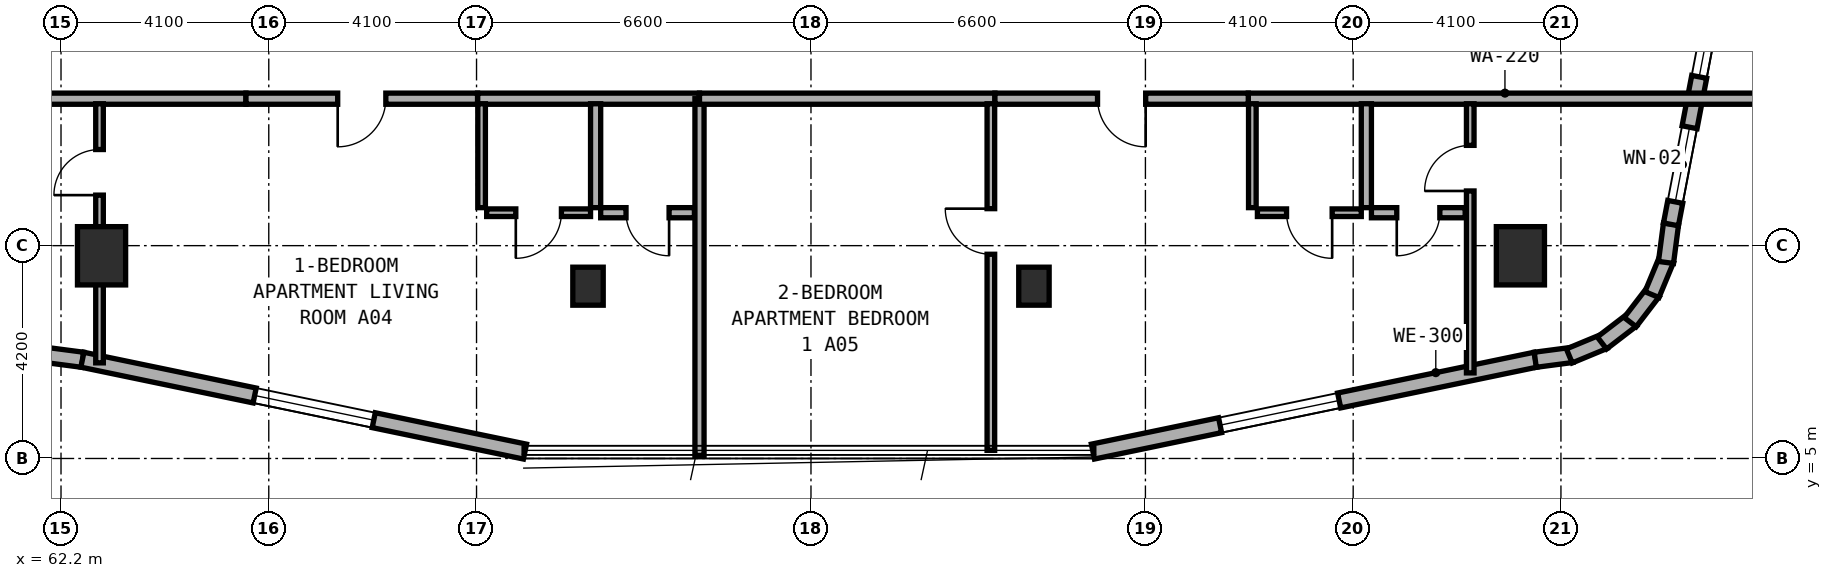
"""IFC4 building model, lengths in metres.
Left out: names, types, materials, properties, quantities, classifications, styles, units other than length and angle.
Written with IfcOpenShell. Run it as: python <this file> out.ifc"""

import sys

from ifc_helpers import new_model, si_unit, direction, frame, frame_2d, origin, origin_2d, place, context, subcontext, project, spatial, rectangle, extrude, element, fill, save


model = new_model("IFC4")
c1 = context("Model", 3, precision=1e-05, world=origin(), true_north=direction((0.0, 1.0)))
c2 = subcontext(c1, "Body", "Model", "MODEL_VIEW")
j1 = project(units=[si_unit("LENGTHUNIT", "METRE"), si_unit("PLANEANGLEUNIT", "RADIAN")], contexts=[c1])
p1 = place(None, origin())
s1 = spatial("IfcSite", under=j1, at=p1, CompositionType="ELEMENT")
p2 = place(p1, origin())
s2 = spatial("IfcBuilding", under=s1, at=p2, CompositionType="ELEMENT")
p3 = place(p2, frame((0.0, 0.0, 73.0)))
s3 = spatial("IfcBuildingStorey", under=s2, at=p3, CompositionType="ELEMENT", Elevation=73.0)
for number, where, z_axis, x_axis in (
    (1, (72.6, 8.4, 0.0), (0.0, 0.0, 1.0), (1.0, 0.0, 0.0)),
    (2, (81.4, 8.4, 0.0), (0.0, 0.0, 1.0), (1.0, 0.0, 0.0)),
):
    element("IfcColumn", number, at=place(p3, frame(where, z_axis=z_axis, x_axis=x_axis)), inside=s3, PredefinedType="COLUMN", context=c2, shape_type="SweptSolid", body=[
        extrude(rectangle(XDim=0.6, YDim=0.75, at=origin_2d()), origin(), (0.0, 0.0, 1.0), 3.5),
    ])
for number, where, z_axis, x_axis in (
    (3, (63.0, 9.0, 0.0), (0.0, 0.0, 1.0), (1.0, 0.0, 0.0)),
    (4, (91.0, 9.0, 0.0), (0.0, 0.0, 1.0), (1.0, 0.0, 0.0)),
):
    element("IfcColumn", number, at=place(p3, frame(where, z_axis=z_axis, x_axis=x_axis)), inside=s3, PredefinedType="COLUMN", context=c2, shape_type="SweptSolid", body=[
        extrude(rectangle(XDim=0.95, YDim=1.15, at=origin_2d()), origin(), (0.0, 0.0, 1.0), 3.5),
    ])
p4 = place(p3, frame((61.869, 7.047, 0.0), z_axis=(0.0, 0.0, 1.0), x_axis=(0.991559404866, -0.129653178221, 0.0)))
e5 = element("IfcWall", 5, at=p4, inside=s3, PredefinedType="STANDARD", context=c2, shape_type="SweptSolid", body=[
    extrude(rectangle(XDim=0.764, YDim=0.3, at=frame_2d((0.382, 0.0))), origin(), (0.0, 0.0, 1.0), 3.25),
])
p5 = place(p3, frame((62.622, 6.949, 0.0), z_axis=(0.0, 0.0, 1.0), x_axis=(0.979127260729, -0.203248142175, 0.0)))
e6 = element("IfcWall", 6, at=p5, inside=s3, PredefinedType="STANDARD", context=c2, shape_type="SweptSolid", body=[
    extrude(rectangle(XDim=8.92, YDim=0.3, at=frame_2d((4.46, 0.0))), origin(), (0.0, 0.0, 1.0), 3.25),
])
p6 = place(p5, frame((3.472, 0.0, 0.8)))
e7 = element("IfcOpeningElement", 7, at=p6, cuts=e6, PredefinedType="OPENING", context=c2, shape_type="SweptSolid", body=[
    extrude(rectangle(XDim=2.4, YDim=1.6, at=frame_2d((1.2, 0.8))), frame((0.0, 0.16, 0.0), z_axis=(0.0, -1.0, 0.0), x_axis=(1.0, 0.0, 0.0)), (0.0, 0.0, 1.0), 0.32),
])
p7 = place(p3, frame((82.564, 5.136, 0.0), z_axis=(0.0, 0.0, 1.0), x_axis=(0.979128391325, 0.203242695569, 0.0)))
e8 = element("IfcWall", 8, at=p7, inside=s3, PredefinedType="STANDARD", context=c2, shape_type="SweptSolid", body=[
    extrude(rectangle(XDim=8.92, YDim=0.3, at=frame_2d((4.46, 0.0))), origin(), (0.0, 0.0, 1.0), 3.25),
])
p8 = place(p7, frame((2.563, 0.0, 0.8)))
e9 = element("IfcOpeningElement", 9, at=p8, cuts=e8, PredefinedType="OPENING", context=c2, shape_type="SweptSolid", body=[
    extrude(rectangle(XDim=2.4, YDim=1.6, at=frame_2d((1.2, 0.8))), frame((0.0, 0.16, 0.0), z_axis=(0.0, -1.0, 0.0), x_axis=(1.0, 0.0, 0.0)), (0.0, 0.0, 1.0), 0.32),
])
p9 = place(p3, frame((91.293, 6.948, 0.0), z_axis=(0.0, 0.0, 1.0), x_axis=(0.991486167159, 0.13021205909, 0.0)))
e10 = element("IfcWall", 10, at=p9, inside=s3, PredefinedType="STANDARD", context=c2, shape_type="SweptSolid", body=[
    extrude(rectangle(XDim=0.729, YDim=0.3, at=frame_2d((0.365, 0.0))), origin(), (0.0, 0.0, 1.0), 3.25),
])
for number, where, z_axis, x_axis in (
    (11, (91.965, 7.024, 0.0), (0.0, 0.0, 1.0), (0.924, 0.384, 0.0)),
    (12, (92.609, 7.279, 0.0), (0.0, 0.0, 1.0), (0.794, 0.608, 0.0)),
    (13, (93.166, 7.691, 0.0), (0.0, 0.0, 1.0), (0.609, 0.793, 0.0)),
):
    element("IfcWall", number, at=place(p3, frame(where, z_axis=z_axis, x_axis=x_axis)), inside=s3, PredefinedType="STANDARD", context=c2, shape_type="SweptSolid", body=[
        extrude(rectangle(XDim=0.746, YDim=0.3, at=frame_2d((0.373, 0.0))), origin(), (0.0, 0.0, 1.0), 3.25),
    ])
p10 = place(p3, frame((93.596, 8.234, 0.0), z_axis=(0.0, 0.0, 1.0), x_axis=(0.383430326427, 0.923569805037, 0.0)))
e14 = element("IfcWall", 14, at=p10, inside=s3, PredefinedType="STANDARD", context=c2, shape_type="SweptSolid", body=[
    extrude(rectangle(XDim=0.746, YDim=0.3, at=frame_2d((0.373, 0.0))), origin(), (0.0, 0.0, 1.0), 3.25),
])
p11 = place(p3, frame((93.873, 8.869, 0.0), z_axis=(0.0, 0.0, 1.0), x_axis=(0.129339184068, 0.991600411186, 0.0)))
e15 = element("IfcWall", 15, at=p11, inside=s3, PredefinedType="STANDARD", context=c2, shape_type="SweptSolid", body=[
    extrude(rectangle(XDim=0.764, YDim=0.3, at=frame_2d((0.382, 0.0))), origin(), (0.0, 0.0, 1.0), 3.25),
])
p12 = place(p3, frame((93.971, 9.62, 0.0), z_axis=(0.0, 0.0, 1.0), x_axis=(0.188087874316, 0.982152203854, 0.0)))
e16 = element("IfcWall", 16, at=p12, inside=s3, PredefinedType="STANDARD", context=c2, shape_type="SweptSolid", body=[
    extrude(rectangle(XDim=9.634, YDim=0.3, at=frame_2d((4.817, 0.0))), origin(), (0.0, 0.0, 1.0), 3.25),
])
p13 = place(p12, frame((0.452, 0.0, 0.85)))
e17 = element("IfcOpeningElement", 17, at=p13, cuts=e16, PredefinedType="OPENING", context=c2, shape_type="SweptSolid", body=[
    extrude(rectangle(XDim=1.5, YDim=1.5, at=frame_2d((0.75, 0.75))), frame((0.0, 0.16, 0.0), z_axis=(0.0, -1.0, 0.0), x_axis=(1.0, 0.0, 0.0)), (0.0, 0.0, 1.0), 0.32),
])
p14 = place(p12, frame((2.964, 0.0, 0.85)))
e18 = element("IfcOpeningElement", 18, at=p14, cuts=e16, PredefinedType="OPENING", context=c2, shape_type="SweptSolid", body=[
    extrude(rectangle(XDim=1.2, YDim=1.5, at=frame_2d((0.6, 0.75))), frame((0.0, 0.16, 0.0), z_axis=(0.0, -1.0, 0.0), x_axis=(1.0, 0.0, 0.0)), (0.0, 0.0, 1.0), 0.32),
])
p15 = place(p12, frame((5.979, 0.0, 0.8)))
e19 = element("IfcOpeningElement", 19, at=p15, cuts=e16, PredefinedType="OPENING", context=c2, shape_type="SweptSolid", body=[
    extrude(rectangle(XDim=2.4, YDim=1.6, at=frame_2d((1.2, 0.8))), frame((0.0, 0.16, 0.0), z_axis=(0.0, -1.0, 0.0), x_axis=(1.0, 0.0, 0.0)), (0.0, 0.0, 1.0), 0.32),
])
p16 = place(p3, frame((58.16, 12.1, 0.0), z_axis=(0.0, 0.0, 1.0), x_axis=(1.0, 0.0, 0.0)))
e20 = element("IfcWall", 20, at=p16, inside=s3, PredefinedType="SOLIDWALL", context=c2, shape_type="SweptSolid", body=[
    extrude(rectangle(XDim=7.69, YDim=0.22, at=frame_2d((3.845, 0.0))), origin(), (0.0, 0.0, 1.0), 2.865),
])
p17 = place(p3, frame((70.42, 12.1, 0.0), z_axis=(0.0, 0.0, 1.0), x_axis=(1.0, 0.0, 0.0)))
e21 = element("IfcWall", 21, at=p17, inside=s3, PredefinedType="SOLIDWALL", context=c2, shape_type="SweptSolid", body=[
    extrude(rectangle(XDim=4.38, YDim=0.22, at=frame_2d((2.19, 0.0))), origin(), (0.0, 0.0, 1.0), 2.725),
])
p18 = place(p3, frame((65.85, 12.1, 0.0), z_axis=(0.0, 0.0, 1.0), x_axis=(1.0, 0.0, 0.0)))
e22 = element("IfcWall", 22, at=p18, inside=s3, PredefinedType="SOLIDWALL", context=c2, shape_type="SweptSolid", body=[
    extrude(rectangle(XDim=4.57, YDim=0.22, at=frame_2d((2.285, 0.0))), origin(), (0.0, 0.0, 1.0), 3.22),
])
p19 = place(p18, frame((1.81, 0.0, 0.0)))
e23 = element("IfcOpeningElement", 23, at=p19, cuts=e22, PredefinedType="OPENING", context=c2, shape_type="SweptSolid", body=[
    extrude(rectangle(XDim=0.95, YDim=2.1, at=frame_2d((0.475, 1.05))), frame((0.0, 0.12, 0.0), z_axis=(0.0, -1.0, 0.0), x_axis=(1.0, 0.0, 0.0)), (0.0, 0.0, 1.0), 0.24),
])
p20 = place(p3, frame((62.96, 6.887, 0.0), z_axis=(0.0, 0.0, 1.0), x_axis=(0.0, 1.0, 0.0)))
e24 = element("IfcWall", 24, at=p20, inside=s3, PredefinedType="PARTITIONING", context=c2, shape_type="SweptSolid", body=[
    extrude(rectangle(XDim=5.113, YDim=0.15, at=frame_2d((2.557, 0.0))), origin(), (0.0, 0.0, 1.0), 2.865),
])
p21 = place(p20, frame((3.31, 0.0, 0.0)))
e25 = element("IfcOpeningElement", 25, at=p21, cuts=e24, PredefinedType="OPENING", context=c2, shape_type="SweptSolid", body=[
    extrude(rectangle(XDim=0.9, YDim=2.1, at=frame_2d((0.45, 1.05))), frame((0.0, 0.085, 0.0), z_axis=(0.0, -1.0, 0.0), x_axis=(1.0, 0.0, 0.0)), (0.0, 0.0, 1.0), 0.17),
])
p22 = place(p3, frame((72.75, 9.95, 0.0), z_axis=(0.0, 0.0, 1.0), x_axis=(0.0, 1.0, 0.0)))
e26 = element("IfcWall", 26, at=p22, inside=s3, PredefinedType="PLUMBINGWALL", context=c2, shape_type="SweptSolid", body=[
    extrude(rectangle(XDim=2.05, YDim=0.2, at=frame_2d((1.025, 0.0))), origin(), (0.0, 0.0, 1.0), 2.725),
])
p23 = place(p3, frame((70.5, 9.95, 0.0), z_axis=(0.0, 0.0, 1.0), x_axis=(0.0, 1.0, 0.0)))
e27 = element("IfcWall", 27, at=p23, inside=s3, PredefinedType="PARTITIONING", context=c2, shape_type="SweptSolid", body=[
    extrude(rectangle(XDim=2.05, YDim=0.15, at=frame_2d((1.025, 0.0))), origin(), (0.0, 0.0, 1.0), 3.22),
])
p24 = place(p3, frame((72.85, 9.85, 0.0), z_axis=(0.0, 0.0, 1.0), x_axis=(1.0, 0.0, 0.0)))
e28 = element("IfcWall", 28, at=p24, inside=s3, PredefinedType="PLUMBINGWALL", context=c2, shape_type="SweptSolid", body=[
    extrude(rectangle(XDim=1.85, YDim=0.2, at=frame_2d((0.925, 0.0))), origin(), (0.0, 0.0, 1.0), 3.22),
])
p25 = place(p24, frame((0.5, 0.0, 0.0)))
e29 = element("IfcOpeningElement", 29, at=p25, cuts=e28, PredefinedType="OPENING", context=c2, shape_type="SweptSolid", body=[
    extrude(rectangle(XDim=0.85, YDim=2.1, at=frame_2d((0.425, 1.05))), frame((0.0, 0.11, 0.0), z_axis=(0.0, -1.0, 0.0), x_axis=(1.0, 0.0, 0.0)), (0.0, 0.0, 1.0), 0.22),
])
p26 = place(p3, frame((70.6, 9.85, 0.0), z_axis=(0.0, 0.0, 1.0), x_axis=(1.0, 0.0, 0.0)))
e30 = element("IfcWall", 30, at=p26, inside=s3, PredefinedType="PARTITIONING", context=c2, shape_type="SweptSolid", body=[
    extrude(rectangle(XDim=2.05, YDim=0.15, at=frame_2d((1.025, 0.0))), origin(), (0.0, 0.0, 1.0), 2.725),
])
p27 = place(p26, frame((0.575, 0.0, 0.0)))
e31 = element("IfcOpeningElement", 31, at=p27, cuts=e30, PredefinedType="OPENING", context=c2, shape_type="SweptSolid", body=[
    extrude(rectangle(XDim=0.9, YDim=2.1, at=frame_2d((0.45, 1.05))), frame((0.0, 0.085, 0.0), z_axis=(0.0, -1.0, 0.0), x_axis=(1.0, 0.0, 0.0)), (0.0, 0.0, 1.0), 0.17),
])
p28 = place(p3, frame((74.8, 5.06, 0.0), z_axis=(0.0, 0.0, 1.0), x_axis=(0.0, 1.0, 0.0)))
e32 = element("IfcWall", 32, at=p28, inside=s3, PredefinedType="SOLIDWALL", context=c2, shape_type="SweptSolid", body=[
    extrude(rectangle(XDim=7.04, YDim=0.18, at=frame_2d((3.52, 0.0))), origin(), (0.0, 0.0, 1.0), 2.865),
])
p29 = place(p3, frame((74.8, 12.1, 0.0), z_axis=(0.0, 0.0, 1.0), x_axis=(1.0, 0.0, 0.0)))
e33 = element("IfcWall", 33, at=p29, inside=s3, PredefinedType="SOLIDWALL", context=c2, shape_type="SweptSolid", body=[
    extrude(rectangle(XDim=5.83, YDim=0.22, at=frame_2d((2.915, 0.0))), origin(), (0.0, 0.0, 1.0), 3.22),
])
p30 = place(p3, frame((85.63, 12.1, 0.0), z_axis=(0.0, 0.0, 1.0), x_axis=(1.0, 0.0, 0.0)))
e34 = element("IfcWall", 34, at=p30, inside=s3, PredefinedType="SOLIDWALL", context=c2, shape_type="SweptSolid", body=[
    extrude(rectangle(XDim=10.13, YDim=0.22, at=frame_2d((5.065, 0.0))), origin(), (0.0, 0.0, 1.0), 2.865),
])
p31 = place(p3, frame((80.63, 12.1, 0.0), z_axis=(0.0, 0.0, 1.0), x_axis=(1.0, 0.0, 0.0)))
e35 = element("IfcWall", 35, at=p31, inside=s3, PredefinedType="SOLIDWALL", context=c2, shape_type="SweptSolid", body=[
    extrude(rectangle(XDim=5.0, YDim=0.22, at=frame_2d((2.5, 0.0))), origin(), (0.0, 0.0, 1.0), 2.725),
])
p32 = place(p31, frame((2.025, 0.0, 0.0)))
e36 = element("IfcOpeningElement", 36, at=p32, cuts=e35, PredefinedType="OPENING", context=c2, shape_type="SweptSolid", body=[
    extrude(rectangle(XDim=0.95, YDim=2.1, at=frame_2d((0.475, 1.05))), frame((0.0, 0.12, 0.0), z_axis=(0.0, -1.0, 0.0), x_axis=(1.0, 0.0, 0.0)), (0.0, 0.0, 1.0), 0.24),
])
p33 = place(p3, frame((80.55, 5.16, 0.0), z_axis=(0.0, 0.0, 1.0), x_axis=(0.0, 1.0, 0.0)))
e37 = element("IfcWall", 37, at=p33, inside=s3, PredefinedType="PARTITIONING", context=c2, shape_type="SweptSolid", body=[
    extrude(rectangle(XDim=6.84, YDim=0.15, at=frame_2d((3.42, 0.0))), origin(), (0.0, 0.0, 1.0), 2.865),
])
p34 = place(p33, frame((3.87, 0.0, 0.0)))
e38 = element("IfcOpeningElement", 38, at=p34, cuts=e37, PredefinedType="OPENING", context=c2, shape_type="SweptSolid", body=[
    extrude(rectangle(XDim=0.9, YDim=2.1, at=frame_2d((0.45, 1.05))), frame((0.0, 0.085, 0.0), z_axis=(0.0, -1.0, 0.0), x_axis=(1.0, 0.0, 0.0)), (0.0, 0.0, 1.0), 0.17),
])
p35 = place(p3, frame((90.01, 6.689, 0.0), z_axis=(0.0, 0.0, 1.0), x_axis=(0.0, 1.0, 0.0)))
e39 = element("IfcWall", 39, at=p35, inside=s3, PredefinedType="PARTITIONING", context=c2, shape_type="SweptSolid", body=[
    extrude(rectangle(XDim=5.311, YDim=0.15, at=frame_2d((2.656, 0.0))), origin(), (0.0, 0.0, 1.0), 2.865),
])
p36 = place(p35, frame((3.59, 0.0, 0.0)))
e40 = element("IfcOpeningElement", 40, at=p36, cuts=e39, PredefinedType="OPENING", context=c2, shape_type="SweptSolid", body=[
    extrude(rectangle(XDim=0.9, YDim=2.1, at=frame_2d((0.45, 1.05))), frame((0.0, 0.085, 0.0), z_axis=(0.0, -1.0, 0.0), x_axis=(1.0, 0.0, 0.0)), (0.0, 0.0, 1.0), 0.17),
])
p37 = place(p3, frame((87.96, 9.95, 0.0), z_axis=(0.0, 0.0, 1.0), x_axis=(0.0, 1.0, 0.0)))
e41 = element("IfcWall", 41, at=p37, inside=s3, PredefinedType="PLUMBINGWALL", context=c2, shape_type="SweptSolid", body=[
    extrude(rectangle(XDim=2.05, YDim=0.2, at=frame_2d((1.025, 0.0))), origin(), (0.0, 0.0, 1.0), 3.22),
])
p38 = place(p3, frame((85.71, 9.95, 0.0), z_axis=(0.0, 0.0, 1.0), x_axis=(0.0, 1.0, 0.0)))
e42 = element("IfcWall", 42, at=p38, inside=s3, PredefinedType="PARTITIONING", context=c2, shape_type="SweptSolid", body=[
    extrude(rectangle(XDim=2.05, YDim=0.15, at=frame_2d((1.025, 0.0))), origin(), (0.0, 0.0, 1.0), 3.22),
])
p39 = place(p3, frame((88.06, 9.85, 0.0), z_axis=(0.0, 0.0, 1.0), x_axis=(1.0, 0.0, 0.0)))
e43 = element("IfcWall", 43, at=p39, inside=s3, PredefinedType="PLUMBINGWALL", context=c2, shape_type="SweptSolid", body=[
    extrude(rectangle(XDim=1.85, YDim=0.2, at=frame_2d((0.925, 0.0))), origin(), (0.0, 0.0, 1.0), 3.22),
])
p40 = place(p39, frame((0.5, 0.0, 0.0)))
e44 = element("IfcOpeningElement", 44, at=p40, cuts=e43, PredefinedType="OPENING", context=c2, shape_type="SweptSolid", body=[
    extrude(rectangle(XDim=0.85, YDim=2.1, at=frame_2d((0.425, 1.05))), frame((0.0, 0.11, 0.0), z_axis=(0.0, -1.0, 0.0), x_axis=(1.0, 0.0, 0.0)), (0.0, 0.0, 1.0), 0.22),
])
p41 = place(p3, frame((85.81, 9.85, 0.0), z_axis=(0.0, 0.0, 1.0), x_axis=(1.0, 0.0, 0.0)))
e45 = element("IfcWall", 45, at=p41, inside=s3, PredefinedType="PARTITIONING", context=c2, shape_type="SweptSolid", body=[
    extrude(rectangle(XDim=2.05, YDim=0.15, at=frame_2d((1.025, 0.0))), origin(), (0.0, 0.0, 1.0), 3.22),
])
p42 = place(p41, frame((0.575, 0.0, 0.0)))
e46 = element("IfcOpeningElement", 46, at=p42, cuts=e45, PredefinedType="OPENING", context=c2, shape_type="SweptSolid", body=[
    extrude(rectangle(XDim=0.9, YDim=2.1, at=frame_2d((0.45, 1.05))), frame((0.0, 0.085, 0.0), z_axis=(0.0, -1.0, 0.0), x_axis=(1.0, 0.0, 0.0)), (0.0, 0.0, 1.0), 0.17),
])
p43 = place(p6, origin())
e47 = element("IfcWindow", 47, at=p43, inside=s3, PartitioningType="SINGLE_PANEL", PredefinedType="WINDOW", context=c2, shape_type="SweptSolid", body=[
    extrude(rectangle(XDim=2.4, YDim=1.6, at=frame_2d((1.2, 0.8))), frame((0.0, 0.03, 0.0), z_axis=(0.0, -1.0, 0.0), x_axis=(1.0, 0.0, 0.0)), (0.0, 0.0, 1.0), 0.06),
])
fill(e7, e47)
p44 = place(p8, origin())
e48 = element("IfcWindow", 48, at=p44, inside=s3, PartitioningType="SINGLE_PANEL", PredefinedType="WINDOW", context=c2, shape_type="SweptSolid", body=[
    extrude(rectangle(XDim=2.4, YDim=1.6, at=frame_2d((1.2, 0.8))), frame((0.0, 0.03, 0.0), z_axis=(0.0, -1.0, 0.0), x_axis=(1.0, 0.0, 0.0)), (0.0, 0.0, 1.0), 0.06),
])
fill(e9, e48)
p45 = place(p13, origin())
e49 = element("IfcWindow", 49, at=p45, inside=s3, PartitioningType="SINGLE_PANEL", PredefinedType="WINDOW", context=c2, shape_type="SweptSolid", body=[
    extrude(rectangle(XDim=1.5, YDim=1.5, at=frame_2d((0.75, 0.75))), frame((0.0, 0.03, 0.0), z_axis=(0.0, -1.0, 0.0), x_axis=(1.0, 0.0, 0.0)), (0.0, 0.0, 1.0), 0.06),
])
fill(e17, e49)
p46 = place(p14, origin())
e50 = element("IfcWindow", 50, at=p46, inside=s3, PartitioningType="SINGLE_PANEL", PredefinedType="WINDOW", context=c2, shape_type="SweptSolid", body=[
    extrude(rectangle(XDim=1.2, YDim=1.5, at=frame_2d((0.6, 0.75))), frame((0.0, 0.03, 0.0), z_axis=(0.0, -1.0, 0.0), x_axis=(1.0, 0.0, 0.0)), (0.0, 0.0, 1.0), 0.06),
])
fill(e18, e50)
p47 = place(p19, frame((0.95, 0.0, 0.0), z_axis=(0.0, 0.0, 1.0), x_axis=(-1.0, 0.0, 0.0)))
e51 = element("IfcDoor", 51, at=p47, inside=s3, OperationType="SINGLE_SWING_RIGHT", PredefinedType="DOOR", context=c2, shape_type="SweptSolid", body=[
    extrude(rectangle(XDim=0.95, YDim=2.1, at=frame_2d((0.475, 1.05))), frame((0.0, 0.025, 0.0), z_axis=(0.0, -1.0, 0.0), x_axis=(1.0, 0.0, 0.0)), (0.0, 0.0, 1.0), 0.05),
])
fill(e23, e51)
p48 = place(p21, origin())
e52 = element("IfcDoor", 52, at=p48, inside=s3, OperationType="SINGLE_SWING_LEFT", PredefinedType="DOOR", context=c2, shape_type="SweptSolid", body=[
    extrude(rectangle(XDim=0.9, YDim=2.1, at=frame_2d((0.45, 1.05))), frame((0.0, 0.025, 0.0), z_axis=(0.0, -1.0, 0.0), x_axis=(1.0, 0.0, 0.0)), (0.0, 0.0, 1.0), 0.05),
])
fill(e25, e52)
p49 = place(p25, frame((0.85, 0.0, 0.0), z_axis=(0.0, 0.0, 1.0), x_axis=(-1.0, 0.0, 0.0)))
e53 = element("IfcDoor", 53, at=p49, inside=s3, OperationType="SINGLE_SWING_LEFT", PredefinedType="DOOR", context=c2, shape_type="SweptSolid", body=[
    extrude(rectangle(XDim=0.85, YDim=2.1, at=frame_2d((0.425, 1.05))), frame((0.0, 0.025, 0.0), z_axis=(0.0, -1.0, 0.0), x_axis=(1.0, 0.0, 0.0)), (0.0, 0.0, 1.0), 0.05),
])
fill(e29, e53)
p50 = place(p27, frame((0.9, 0.0, 0.0), z_axis=(0.0, 0.0, 1.0), x_axis=(-1.0, 0.0, 0.0)))
e54 = element("IfcDoor", 54, at=p50, inside=s3, OperationType="SINGLE_SWING_RIGHT", PredefinedType="DOOR", context=c2, shape_type="SweptSolid", body=[
    extrude(rectangle(XDim=0.9, YDim=2.1, at=frame_2d((0.45, 1.05))), frame((0.0, 0.025, 0.0), z_axis=(0.0, -1.0, 0.0), x_axis=(1.0, 0.0, 0.0)), (0.0, 0.0, 1.0), 0.05),
])
fill(e31, e54)
p51 = place(p32, frame((0.95, 0.0, 0.0), z_axis=(0.0, 0.0, 1.0), x_axis=(-1.0, 0.0, 0.0)))
e55 = element("IfcDoor", 55, at=p51, inside=s3, OperationType="SINGLE_SWING_LEFT", PredefinedType="DOOR", context=c2, shape_type="SweptSolid", body=[
    extrude(rectangle(XDim=0.95, YDim=2.1, at=frame_2d((0.475, 1.05))), frame((0.0, 0.025, 0.0), z_axis=(0.0, -1.0, 0.0), x_axis=(1.0, 0.0, 0.0)), (0.0, 0.0, 1.0), 0.05),
])
fill(e36, e55)
p52 = place(p34, origin())
e56 = element("IfcDoor", 56, at=p52, inside=s3, OperationType="SINGLE_SWING_RIGHT", PredefinedType="DOOR", context=c2, shape_type="SweptSolid", body=[
    extrude(rectangle(XDim=0.9, YDim=2.1, at=frame_2d((0.45, 1.05))), frame((0.0, 0.025, 0.0), z_axis=(0.0, -1.0, 0.0), x_axis=(1.0, 0.0, 0.0)), (0.0, 0.0, 1.0), 0.05),
])
fill(e38, e56)
p53 = place(p36, origin())
e57 = element("IfcDoor", 57, at=p53, inside=s3, OperationType="SINGLE_SWING_LEFT", PredefinedType="DOOR", context=c2, shape_type="SweptSolid", body=[
    extrude(rectangle(XDim=0.9, YDim=2.1, at=frame_2d((0.45, 1.05))), frame((0.0, 0.025, 0.0), z_axis=(0.0, -1.0, 0.0), x_axis=(1.0, 0.0, 0.0)), (0.0, 0.0, 1.0), 0.05),
])
fill(e40, e57)
p54 = place(p40, frame((0.85, 0.0, 0.0), z_axis=(0.0, 0.0, 1.0), x_axis=(-1.0, 0.0, 0.0)))
e58 = element("IfcDoor", 58, at=p54, inside=s3, OperationType="SINGLE_SWING_RIGHT", PredefinedType="DOOR", context=c2, shape_type="SweptSolid", body=[
    extrude(rectangle(XDim=0.85, YDim=2.1, at=frame_2d((0.425, 1.05))), frame((0.0, 0.025, 0.0), z_axis=(0.0, -1.0, 0.0), x_axis=(1.0, 0.0, 0.0)), (0.0, 0.0, 1.0), 0.05),
])
fill(e44, e58)
p55 = place(p42, frame((0.9, 0.0, 0.0), z_axis=(0.0, 0.0, 1.0), x_axis=(-1.0, 0.0, 0.0)))
e59 = element("IfcDoor", 59, at=p55, inside=s3, OperationType="SINGLE_SWING_LEFT", PredefinedType="DOOR", context=c2, shape_type="SweptSolid", body=[
    extrude(rectangle(XDim=0.9, YDim=2.1, at=frame_2d((0.45, 1.05))), frame((0.0, 0.025, 0.0), z_axis=(0.0, -1.0, 0.0), x_axis=(1.0, 0.0, 0.0)), (0.0, 0.0, 1.0), 0.05),
])
fill(e46, e59)
save(model, sys.argv[1])
